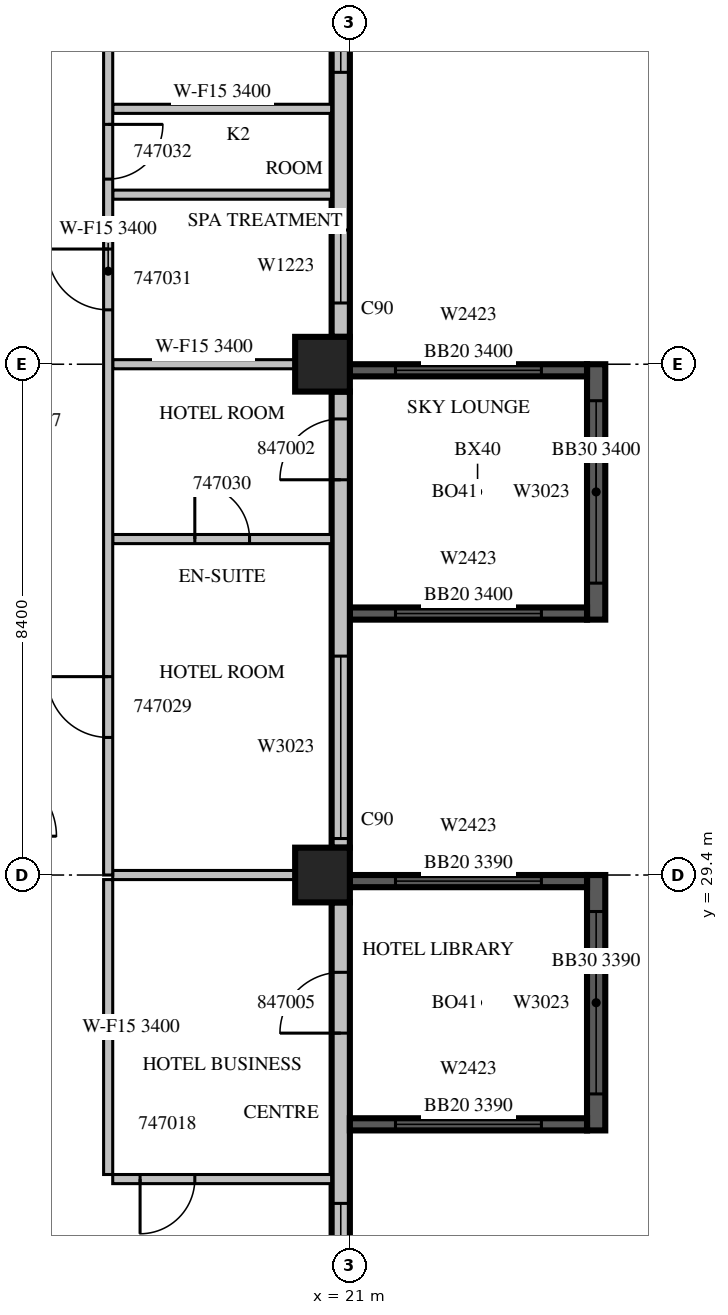
"""IFC4 building model, lengths in metres.
Left out: names, types, materials, properties, quantities, classifications, styles, units other than length and angle.
Written with IfcOpenShell. Run it as: python <this file> out.ifc"""

import sys

from ifc_helpers import new_model, si_unit, direction, frame, frame_2d, origin, origin_2d, place, context, subcontext, project, spatial, rectangle, extrude, source, transform, mapped, element, fill, save


model = new_model("IFC4")
c1 = context("Model", 3, precision=1e-05, world=origin(), true_north=direction((0.0, 1.0)))
c2 = subcontext(c1, "Body", "Model", "MODEL_VIEW")
j1 = project(units=[si_unit("LENGTHUNIT", "METRE"), si_unit("PLANEANGLEUNIT", "RADIAN")], contexts=[c1])
p1 = place(None, origin())
s1 = spatial("IfcSite", under=j1, at=p1, CompositionType="ELEMENT")
p2 = place(p1, origin())
s2 = spatial("IfcBuilding", under=s1, at=p2, CompositionType="ELEMENT")
p3 = place(p2, frame((0.0, 0.0, 212.0)))
s3 = spatial("IfcBuildingStorey", under=s2, at=p3, CompositionType="ELEMENT", Elevation=212.0)
m1 = source(origin(), c2, "Body", "SweptSolid", [
    extrude(rectangle(XDim=0.9, YDim=0.9, at=origin_2d()), origin(), (0.0, 0.0, 1.0), 3.8),
])
for number, where, z_axis, x_axis in (
    (1, (20.55, 29.4, 0.0), (0.0, 0.0, 1.0), (1.0, 0.0, 0.0)),
    (2, (20.55, 37.8, 0.0), (0.0, 0.0, 1.0), (1.0, 0.0, 0.0)),
):
    element("IfcColumn", number, at=place(p3, frame(where, z_axis=z_axis, x_axis=x_axis)), inside=s3, PredefinedType="COLUMN", context=c2, shape_type="MappedRepresentation", body=[
        mapped(m1, transform((0.0, 0.0, 0.0), scale=1.0)),
    ])
m2 = source(origin(), c2, "Body", "SweptSolid", [
    extrude(rectangle(XDim=4.2, YDim=0.3, at=frame_2d((2.1, 0.0))), origin(), (0.0, 0.0, 1.0), 3.4),
])
p4 = place(p3, frame((25.05, 33.6, 0.0), z_axis=(0.0, 0.0, 1.0), x_axis=(0.0, 1.0, 0.0)))
e3 = element("IfcWall", 3, at=p4, inside=s3, PredefinedType="SOLIDWALL", context=c2, shape_type="MappedRepresentation", body=[
    mapped(m2, transform((0.0, 0.0, 0.0), scale=1.0)),
])
m3 = source(origin(), c2, "Body", "SweptSolid", [
    extrude(rectangle(XDim=3.0, YDim=2.3, at=frame_2d((1.5, 1.15))), frame((0.0, 0.16, 0.0), z_axis=(0.0, -1.0, 0.0), x_axis=(1.0, 0.0, 0.0)), (0.0, 0.0, 1.0), 0.32),
])
p5 = place(p4, frame((0.6, 0.0, 0.6)))
e4 = element("IfcOpeningElement", 4, at=p5, cuts=e3, PredefinedType="OPENING", context=c2, shape_type="MappedRepresentation", body=[
    mapped(m3, transform((0.0, 0.0, 0.0), scale=1.0)),
])
m4 = source(origin(), c2, "Body", "SweptSolid", [
    extrude(rectangle(XDim=3.9, YDim=0.2, at=frame_2d((1.95, 0.0))), origin(), (0.0, 0.0, 1.0), 3.4),
])
p6 = place(p3, frame((21.0, 33.7, 0.0), z_axis=(0.0, 0.0, 1.0), x_axis=(1.0, 0.0, 0.0)))
e5 = element("IfcWall", 5, at=p6, inside=s3, PredefinedType="SOLIDWALL", context=c2, shape_type="MappedRepresentation", body=[
    mapped(m4, transform((0.0, 0.0, 0.0), scale=1.0)),
])
m5 = source(origin(), c2, "Body", "SweptSolid", [
    extrude(rectangle(XDim=2.4, YDim=2.3, at=frame_2d((1.2, 1.15))), frame((0.0, 0.11, 0.0), z_axis=(0.0, -1.0, 0.0), x_axis=(1.0, 0.0, 0.0)), (0.0, 0.0, 1.0), 0.22),
])
p7 = place(p6, frame((0.75, 0.0, 0.6)))
e6 = element("IfcOpeningElement", 6, at=p7, cuts=e5, PredefinedType="OPENING", context=c2, shape_type="MappedRepresentation", body=[
    mapped(m5, transform((0.0, 0.0, 0.0), scale=1.0)),
])
p8 = place(p3, frame((21.0, 37.7, 0.0), z_axis=(0.0, 0.0, 1.0), x_axis=(1.0, 0.0, 0.0)))
e7 = element("IfcWall", 7, at=p8, inside=s3, PredefinedType="SOLIDWALL", context=c2, shape_type="MappedRepresentation", body=[
    mapped(m4, transform((0.0, 0.0, 0.0), scale=1.0)),
])
p9 = place(p8, frame((0.75, 0.0, 0.6)))
e8 = element("IfcOpeningElement", 8, at=p9, cuts=e7, PredefinedType="OPENING", context=c2, shape_type="MappedRepresentation", body=[
    mapped(m5, transform((0.0, 0.0, 0.0), scale=1.0)),
])
m6 = source(origin(), c2, "Body", "SweptSolid", [
    extrude(rectangle(XDim=7.15, YDim=0.3, at=frame_2d((3.575, 0.0))), origin(), (0.0, 0.0, 1.0), 3.4),
])
p10 = place(p3, frame((20.85, 21.8, 0.0), z_axis=(0.0, 0.0, 1.0), x_axis=(0.0, 1.0, 0.0)))
e9 = element("IfcWall", 9, at=p10, inside=s3, PredefinedType="STANDARD", context=c2, shape_type="MappedRepresentation", body=[
    mapped(m6, transform((0.0, 0.0, 0.0), scale=1.0)),
])
m7 = source(origin(), c2, "Body", "SweptSolid", [
    extrude(rectangle(XDim=1.8, YDim=2.3, at=frame_2d((0.9, 1.15))), frame((0.0, 0.16, 0.0), z_axis=(0.0, -1.0, 0.0), x_axis=(1.0, 0.0, 0.0)), (0.0, 0.0, 1.0), 0.32),
])
p11 = place(p10, frame((0.4, 0.0, 0.6)))
e10 = element("IfcOpeningElement", 10, at=p11, cuts=e9, PredefinedType="OPENING", context=c2, shape_type="MappedRepresentation", body=[
    mapped(m7, transform((0.0, 0.0, 0.0), scale=1.0)),
])
m8 = source(origin(), c2, "Body", "SweptSolid", [
    extrude(rectangle(XDim=1.0, YDim=2.1, at=frame_2d((0.5, 1.05))), frame((0.0, 0.16, 0.0), z_axis=(0.0, -1.0, 0.0), x_axis=(1.0, 0.0, 0.0)), (0.0, 0.0, 1.0), 0.32),
])
p12 = place(p10, frame((5.0, 0.0, 0.0)))
e11 = element("IfcOpeningElement", 11, at=p12, cuts=e9, PredefinedType="OPENING", context=c2, shape_type="MappedRepresentation", body=[
    mapped(m8, transform((0.0, 0.0, 0.0), scale=1.0)),
])
m9 = source(origin(), c2, "Body", "SweptSolid", [
    extrude(rectangle(XDim=7.5, YDim=0.3, at=frame_2d((3.75, 0.0))), origin(), (0.0, 0.0, 1.0), 3.4),
])
p13 = place(p3, frame((20.85, 29.85, 0.0), z_axis=(0.0, 0.0, 1.0), x_axis=(0.0, 1.0, 0.0)))
e12 = element("IfcWall", 12, at=p13, inside=s3, PredefinedType="STANDARD", context=c2, shape_type="MappedRepresentation", body=[
    mapped(m9, transform((0.0, 0.0, 0.0), scale=1.0)),
])
p14 = place(p13, frame((0.15, 0.0, 0.6)))
e13 = element("IfcOpeningElement", 13, at=p14, cuts=e12, PredefinedType="OPENING", context=c2, shape_type="MappedRepresentation", body=[
    mapped(m3, transform((0.0, 0.0, 0.0), scale=1.0)),
])
p15 = place(p13, frame((6.05, 0.0, 0.0)))
e14 = element("IfcOpeningElement", 14, at=p15, cuts=e12, PredefinedType="OPENING", context=c2, shape_type="MappedRepresentation", body=[
    mapped(m8, transform((0.0, 0.0, 0.0), scale=1.0)),
])
p16 = place(p3, frame((20.85, 38.25, 0.0), z_axis=(0.0, 0.0, 1.0), x_axis=(0.0, 1.0, 0.0)))
e15 = element("IfcWall", 15, at=p16, inside=s3, PredefinedType="STANDARD", context=c2, shape_type="MappedRepresentation", body=[
    mapped(m9, transform((0.0, 0.0, 0.0), scale=1.0)),
])
m10 = source(origin(), c2, "Body", "SweptSolid", [
    extrude(rectangle(XDim=1.2, YDim=2.3, at=frame_2d((0.6, 1.15))), frame((0.0, 0.16, 0.0), z_axis=(0.0, -1.0, 0.0), x_axis=(1.0, 0.0, 0.0)), (0.0, 0.0, 1.0), 0.32),
])
p17 = place(p16, frame((0.557, 0.0, 0.6)))
e16 = element("IfcOpeningElement", 16, at=p17, cuts=e15, PredefinedType="OPENING", context=c2, shape_type="MappedRepresentation", body=[
    mapped(m10, transform((0.0, 0.0, 0.0), scale=1.0)),
])
p18 = place(p16, frame((4.35, 0.0, 0.6)))
e17 = element("IfcOpeningElement", 17, at=p18, cuts=e15, PredefinedType="OPENING", context=c2, shape_type="MappedRepresentation", body=[
    mapped(m3, transform((0.0, 0.0, 0.0), scale=1.0)),
])
m11 = source(origin(), c2, "Body", "SweptSolid", [
    extrude(rectangle(XDim=4.2, YDim=0.3, at=frame_2d((2.1, 0.0))), origin(), (0.0, 0.0, 1.0), 3.39),
])
p19 = place(p3, frame((25.05, 25.2, 0.0), z_axis=(0.0, 0.0, 1.0), x_axis=(0.0, 1.0, 0.0)))
e18 = element("IfcWall", 18, at=p19, inside=s3, PredefinedType="SOLIDWALL", context=c2, shape_type="MappedRepresentation", body=[
    mapped(m11, transform((0.0, 0.0, 0.0), scale=1.0)),
])
p20 = place(p19, frame((0.6, 0.0, 0.6)))
e19 = element("IfcOpeningElement", 19, at=p20, cuts=e18, PredefinedType="OPENING", context=c2, shape_type="MappedRepresentation", body=[
    mapped(m3, transform((0.0, 0.0, 0.0), scale=1.0)),
])
m12 = source(origin(), c2, "Body", "SweptSolid", [
    extrude(rectangle(XDim=3.9, YDim=0.2, at=frame_2d((1.95, 0.0))), origin(), (0.0, 0.0, 1.0), 3.39),
])
p21 = place(p3, frame((21.0, 25.3, 0.0), z_axis=(0.0, 0.0, 1.0), x_axis=(1.0, 0.0, 0.0)))
e20 = element("IfcWall", 20, at=p21, inside=s3, PredefinedType="SOLIDWALL", context=c2, shape_type="MappedRepresentation", body=[
    mapped(m12, transform((0.0, 0.0, 0.0), scale=1.0)),
])
p22 = place(p21, frame((0.75, 0.0, 0.6)))
e21 = element("IfcOpeningElement", 21, at=p22, cuts=e20, PredefinedType="OPENING", context=c2, shape_type="MappedRepresentation", body=[
    mapped(m5, transform((0.0, 0.0, 0.0), scale=1.0)),
])
p23 = place(p3, frame((21.0, 29.3, 0.0), z_axis=(0.0, 0.0, 1.0), x_axis=(1.0, 0.0, 0.0)))
e22 = element("IfcWall", 22, at=p23, inside=s3, PredefinedType="SOLIDWALL", context=c2, shape_type="MappedRepresentation", body=[
    mapped(m12, transform((0.0, 0.0, 0.0), scale=1.0)),
])
p24 = place(p23, frame((0.75, 0.0, 0.6)))
e23 = element("IfcOpeningElement", 23, at=p24, cuts=e22, PredefinedType="OPENING", context=c2, shape_type="MappedRepresentation", body=[
    mapped(m5, transform((0.0, 0.0, 0.0), scale=1.0)),
])
m13 = source(origin(), c2, "Body", "SweptSolid", [
    extrude(rectangle(XDim=3.6, YDim=0.15, at=frame_2d((1.8, 0.0))), origin(), (0.0, 0.0, 1.0), 3.4),
])
p25 = place(p3, frame((17.1, 24.4, 0.0), z_axis=(0.0, 0.0, 1.0), x_axis=(1.0, 0.0, 0.0)))
e24 = element("IfcWall", 24, at=p25, inside=s3, PredefinedType="PARTITIONING", context=c2, shape_type="MappedRepresentation", body=[
    mapped(m13, transform((0.0, 0.0, 0.0), scale=1.0)),
])
m14 = source(origin(), c2, "Body", "SweptSolid", [
    extrude(rectangle(XDim=0.9, YDim=2.1, at=frame_2d((0.45, 1.05))), frame((0.0, 0.085, 0.0), z_axis=(0.0, -1.0, 0.0), x_axis=(1.0, 0.0, 0.0)), (0.0, 0.0, 1.0), 0.17),
])
p26 = place(p25, frame((0.45, 0.0, 0.0)))
e25 = element("IfcOpeningElement", 25, at=p26, cuts=e24, PredefinedType="OPENING", context=c2, shape_type="MappedRepresentation", body=[
    mapped(m14, transform((0.0, 0.0, 0.0), scale=1.0)),
])
m15 = source(origin(), c2, "Body", "SweptSolid", [
    extrude(rectangle(XDim=4.85, YDim=0.15, at=frame_2d((2.425, 0.0))), origin(), (0.0, 0.0, 1.0), 3.4),
])
p27 = place(p3, frame((17.025, 29.325, 0.0), z_axis=(0.0, 0.0, 1.0), x_axis=(0.0, -1.0, 0.0)))
e26 = element("IfcWall", 26, at=p27, inside=s3, PredefinedType="PARTITIONING", context=c2, shape_type="MappedRepresentation", body=[
    mapped(m15, transform((0.0, 0.0, 0.0), scale=1.0)),
])
m16 = source(origin(), c2, "Body", "SweptSolid", [
    extrude(rectangle(XDim=3.001, YDim=0.15, at=frame_2d((1.5, 0.0))), origin(), (0.0, 0.0, 1.0), 3.4),
])
p28 = place(p3, frame((20.101, 29.4, 0.0), z_axis=(0.0, 0.0, 1.0), x_axis=(-1.0, 0.0, 0.0)))
e27 = element("IfcWall", 27, at=p28, inside=s3, PredefinedType="PARTITIONING", context=c2, shape_type="MappedRepresentation", body=[
    mapped(m16, transform((0.0, 0.0, 0.0), scale=1.0)),
])
p29 = place(p3, frame((17.1, 34.925, 0.0), z_axis=(0.0, 0.0, 1.0), x_axis=(1.0, 0.0, 0.0)))
e28 = element("IfcWall", 28, at=p29, inside=s3, PredefinedType="PARTITIONING", context=c2, shape_type="MappedRepresentation", body=[
    mapped(m13, transform((0.0, 0.0, 0.0), scale=1.0)),
])
p30 = place(p29, frame((1.35, 0.0, 0.0)))
e29 = element("IfcOpeningElement", 29, at=p30, cuts=e28, PredefinedType="OPENING", context=c2, shape_type="MappedRepresentation", body=[
    mapped(m14, transform((0.0, 0.0, 0.0), scale=1.0)),
])
p31 = place(p3, frame((17.1, 40.589, 0.0), z_axis=(0.0, 0.0, 1.0), x_axis=(1.0, 0.0, 0.0)))
e30 = element("IfcWall", 30, at=p31, inside=s3, PredefinedType="PARTITIONING", context=c2, shape_type="MappedRepresentation", body=[
    mapped(m13, transform((0.0, 0.0, 0.0), scale=1.0)),
])
p32 = place(p3, frame((20.101, 37.8, 0.0), z_axis=(0.0, 0.0, 1.0), x_axis=(-1.0, 0.0, 0.0)))
e31 = element("IfcWall", 31, at=p32, inside=s3, PredefinedType="PARTITIONING", context=c2, shape_type="MappedRepresentation", body=[
    mapped(m16, transform((0.0, 0.0, 0.0), scale=1.0)),
])
p33 = place(p3, frame((20.7, 42.0, 0.0), z_axis=(0.0, 0.0, 1.0), x_axis=(-1.0, 0.0, 0.0)))
e32 = element("IfcWall", 32, at=p33, inside=s3, PredefinedType="PARTITIONING", context=c2, shape_type="MappedRepresentation", body=[
    mapped(m13, transform((0.0, 0.0, 0.0), scale=1.0)),
])
m17 = source(origin(), c2, "Body", "SweptSolid", [
    extrude(rectangle(XDim=19.86, YDim=0.15, at=frame_2d((9.93, 0.0))), origin(), (0.0, 0.0, 1.0), 3.4),
])
p34 = place(p3, frame((17.025, 49.26, 0.0), z_axis=(0.0, 0.0, 1.0), x_axis=(0.0, -1.0, 0.0)))
e33 = element("IfcWall", 33, at=p34, inside=s3, PredefinedType="PARTITIONING", context=c2, shape_type="MappedRepresentation", body=[
    mapped(m17, transform((0.0, 0.0, 0.0), scale=1.0)),
])
m18 = source(origin(), c2, "Body", "SweptSolid", [
    extrude(rectangle(XDim=1.0, YDim=2.1, at=frame_2d((0.5, 1.05))), frame((0.0, 0.085, 0.0), z_axis=(0.0, -1.0, 0.0), x_axis=(1.0, 0.0, 0.0)), (0.0, 0.0, 1.0), 0.17),
])
p35 = place(p34, frame((16.598, 0.0, 0.0)))
e34 = element("IfcOpeningElement", 34, at=p35, cuts=e33, PredefinedType="OPENING", context=c2, shape_type="MappedRepresentation", body=[
    mapped(m18, transform((0.0, 0.0, 0.0), scale=1.0)),
])
p36 = place(p34, frame((9.566, 0.0, 0.0)))
e35 = element("IfcOpeningElement", 35, at=p36, cuts=e33, PredefinedType="OPENING", context=c2, shape_type="MappedRepresentation", body=[
    mapped(m18, transform((0.0, 0.0, 0.0), scale=1.0)),
])
p37 = place(p34, frame((7.516, 0.0, 0.0)))
e36 = element("IfcOpeningElement", 36, at=p37, cuts=e33, PredefinedType="OPENING", context=c2, shape_type="MappedRepresentation", body=[
    mapped(m14, transform((0.0, 0.0, 0.0), scale=1.0)),
])
p38 = place(p34, frame((3.143, 0.0, 0.0)))
e37 = element("IfcOpeningElement", 37, at=p38, cuts=e33, PredefinedType="OPENING", context=c2, shape_type="MappedRepresentation", body=[
    mapped(m14, transform((0.0, 0.0, 0.0), scale=1.0)),
])
m19 = source(origin(), c2, "Body", "SweptSolid", [
    extrude(rectangle(XDim=3.0, YDim=2.3, at=frame_2d((1.5, 1.15))), frame((0.0, 0.03, 0.0), z_axis=(0.0, -1.0, 0.0), x_axis=(1.0, 0.0, 0.0)), (0.0, 0.0, 1.0), 0.06),
])
p39 = place(p5, origin())
e38 = element("IfcWindow", 38, at=p39, inside=s3, PartitioningType="SINGLE_PANEL", PredefinedType="WINDOW", context=c2, shape_type="MappedRepresentation", body=[
    mapped(m19, transform((0.0, 0.0, 0.0), scale=1.0)),
])
fill(e4, e38)
m20 = source(origin(), c2, "Body", "SweptSolid", [
    extrude(rectangle(XDim=2.4, YDim=2.3, at=frame_2d((1.2, 1.15))), frame((0.0, 0.03, 0.0), z_axis=(0.0, -1.0, 0.0), x_axis=(1.0, 0.0, 0.0)), (0.0, 0.0, 1.0), 0.06),
])
p40 = place(p7, origin())
e39 = element("IfcWindow", 39, at=p40, inside=s3, PartitioningType="SINGLE_PANEL", PredefinedType="WINDOW", context=c2, shape_type="MappedRepresentation", body=[
    mapped(m20, transform((0.0, 0.0, 0.0), scale=1.0)),
])
fill(e6, e39)
p41 = place(p9, origin())
e40 = element("IfcWindow", 40, at=p41, inside=s3, PartitioningType="SINGLE_PANEL", PredefinedType="WINDOW", context=c2, shape_type="MappedRepresentation", body=[
    mapped(m20, transform((0.0, 0.0, 0.0), scale=1.0)),
])
fill(e8, e40)
m21 = source(origin(), c2, "Body", "SweptSolid", [
    extrude(rectangle(XDim=1.8, YDim=2.3, at=frame_2d((0.9, 1.15))), frame((0.0, 0.03, 0.0), z_axis=(0.0, -1.0, 0.0), x_axis=(1.0, 0.0, 0.0)), (0.0, 0.0, 1.0), 0.06),
])
p42 = place(p11, origin())
e41 = element("IfcWindow", 41, at=p42, inside=s3, PartitioningType="SINGLE_PANEL", PredefinedType="WINDOW", context=c2, shape_type="MappedRepresentation", body=[
    mapped(m21, transform((0.0, 0.0, 0.0), scale=1.0)),
])
fill(e10, e41)
p43 = place(p14, origin())
e42 = element("IfcWindow", 42, at=p43, inside=s3, PartitioningType="SINGLE_PANEL", PredefinedType="WINDOW", context=c2, shape_type="MappedRepresentation", body=[
    mapped(m19, transform((0.0, 0.0, 0.0), scale=1.0)),
])
fill(e13, e42)
m22 = source(origin(), c2, "Body", "SweptSolid", [
    extrude(rectangle(XDim=1.2, YDim=2.3, at=frame_2d((0.6, 1.15))), frame((0.0, 0.03, 0.0), z_axis=(0.0, -1.0, 0.0), x_axis=(1.0, 0.0, 0.0)), (0.0, 0.0, 1.0), 0.06),
])
p44 = place(p17, origin())
e43 = element("IfcWindow", 43, at=p44, inside=s3, PartitioningType="SINGLE_PANEL", PredefinedType="WINDOW", context=c2, shape_type="MappedRepresentation", body=[
    mapped(m22, transform((0.0, 0.0, 0.0), scale=1.0)),
])
fill(e16, e43)
p45 = place(p18, origin())
e44 = element("IfcWindow", 44, at=p45, inside=s3, PartitioningType="SINGLE_PANEL", PredefinedType="WINDOW", context=c2, shape_type="MappedRepresentation", body=[
    mapped(m19, transform((0.0, 0.0, 0.0), scale=1.0)),
])
fill(e17, e44)
p46 = place(p20, origin())
e45 = element("IfcWindow", 45, at=p46, inside=s3, PartitioningType="SINGLE_PANEL", PredefinedType="WINDOW", context=c2, shape_type="MappedRepresentation", body=[
    mapped(m19, transform((0.0, 0.0, 0.0), scale=1.0)),
])
fill(e19, e45)
p47 = place(p22, origin())
e46 = element("IfcWindow", 46, at=p47, inside=s3, PartitioningType="SINGLE_PANEL", PredefinedType="WINDOW", context=c2, shape_type="MappedRepresentation", body=[
    mapped(m20, transform((0.0, 0.0, 0.0), scale=1.0)),
])
fill(e21, e46)
p48 = place(p24, origin())
e47 = element("IfcWindow", 47, at=p48, inside=s3, PartitioningType="SINGLE_PANEL", PredefinedType="WINDOW", context=c2, shape_type="MappedRepresentation", body=[
    mapped(m20, transform((0.0, 0.0, 0.0), scale=1.0)),
])
fill(e23, e47)
m23 = source(origin(), c2, "Body", "SweptSolid", [
    extrude(rectangle(XDim=0.9, YDim=2.1, at=frame_2d((0.45, 1.05))), frame((0.0, 0.025, 0.0), z_axis=(0.0, -1.0, 0.0), x_axis=(1.0, 0.0, 0.0)), (0.0, 0.0, 1.0), 0.05),
])
p49 = place(p26, origin())
e48 = element("IfcDoor", 48, at=p49, inside=s3, OperationType="SINGLE_SWING_RIGHT", PredefinedType="DOOR", context=c2, shape_type="MappedRepresentation", body=[
    mapped(m23, transform((0.0, 0.0, 0.0), scale=1.0)),
])
fill(e25, e48)
m24 = source(origin(), c2, "Body", "SweptSolid", [
    extrude(rectangle(XDim=1.0, YDim=2.1, at=frame_2d((0.5, 1.05))), frame((0.0, 0.025, 0.0), z_axis=(0.0, -1.0, 0.0), x_axis=(1.0, 0.0, 0.0)), (0.0, 0.0, 1.0), 0.05),
])
p50 = place(p35, origin())
e49 = element("IfcDoor", 49, at=p50, inside=s3, OperationType="SINGLE_SWING_RIGHT", PredefinedType="DOOR", context=c2, shape_type="MappedRepresentation", body=[
    mapped(m24, transform((0.0, 0.0, 0.0), scale=1.0)),
])
fill(e34, e49)
p51 = place(p30, origin())
e50 = element("IfcDoor", 50, at=p51, inside=s3, OperationType="SINGLE_SWING_LEFT", PredefinedType="DOOR", context=c2, shape_type="MappedRepresentation", body=[
    mapped(m23, transform((0.0, 0.0, 0.0), scale=1.0)),
])
fill(e29, e50)
p52 = place(p36, origin())
e51 = element("IfcDoor", 51, at=p52, inside=s3, OperationType="SINGLE_SWING_RIGHT", PredefinedType="DOOR", context=c2, shape_type="MappedRepresentation", body=[
    mapped(m24, transform((0.0, 0.0, 0.0), scale=1.0)),
])
fill(e35, e51)
p53 = place(p37, origin())
e52 = element("IfcDoor", 52, at=p53, inside=s3, OperationType="SINGLE_SWING_LEFT", PredefinedType="DOOR", context=c2, shape_type="MappedRepresentation", body=[
    mapped(m23, transform((0.0, 0.0, 0.0), scale=1.0)),
])
fill(e36, e52)
p54 = place(p15, origin())
e53 = element("IfcDoor", 53, at=p54, inside=s3, OperationType="SINGLE_SWING_LEFT", PredefinedType="DOOR", context=c2, shape_type="MappedRepresentation", body=[
    mapped(m24, transform((0.0, 0.0, 0.0), scale=1.0)),
])
fill(e14, e53)
p55 = place(p12, origin())
e54 = element("IfcDoor", 54, at=p55, inside=s3, OperationType="SINGLE_SWING_LEFT", PredefinedType="DOOR", context=c2, shape_type="MappedRepresentation", body=[
    mapped(m24, transform((0.0, 0.0, 0.0), scale=1.0)),
])
fill(e11, e54)
save(model, sys.argv[1])
